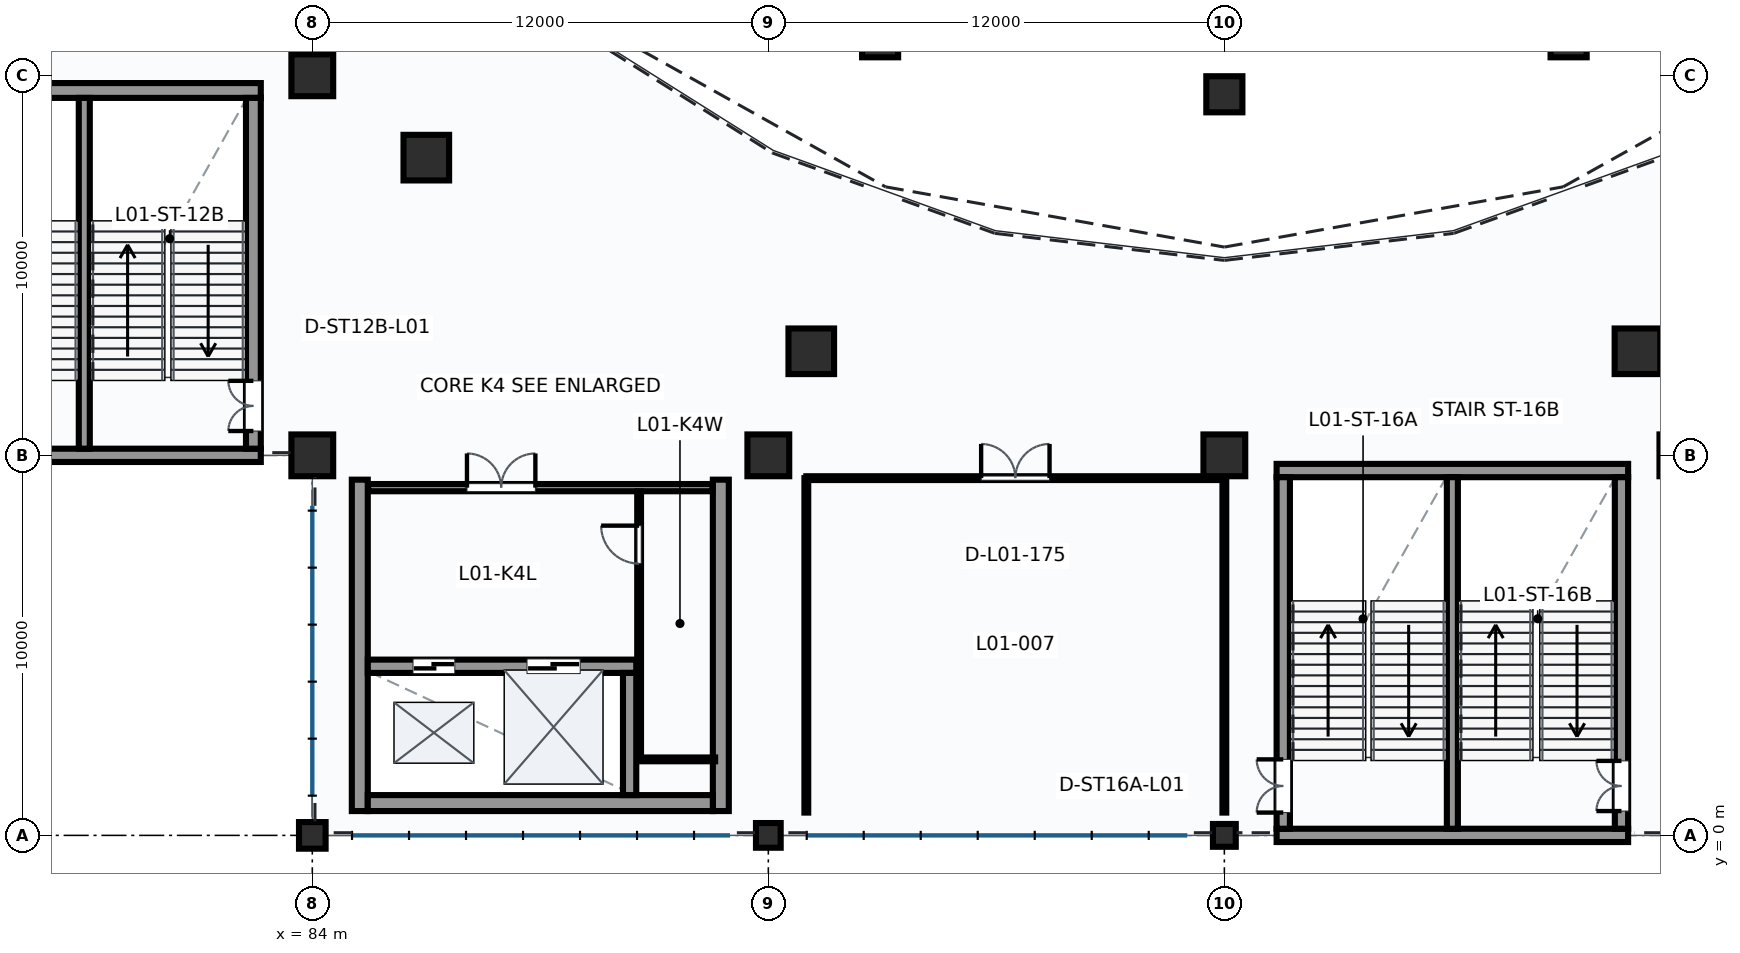
"""IFC4 building model, lengths in metres.
Left out: names, types, materials, properties, quantities, classifications, styles, units other than length and angle.
Written with IfcOpenShell. Run it as: python <this file> out.ifc"""

import sys

from ifc_helpers import new_model, si_unit, direction, frame, frame_2d, origin, origin_2d, place, context, subcontext, project, spatial, rectangle, extrude, element, fill, save


model = new_model("IFC4")
c1 = context("Model", 3, precision=1e-05, world=origin(), true_north=direction((0.0, 1.0)))
c2 = subcontext(c1, "Body", "Model", "MODEL_VIEW")
j1 = project(units=[si_unit("LENGTHUNIT", "METRE"), si_unit("PLANEANGLEUNIT", "RADIAN")], contexts=[c1])
p1 = place(None, origin())
s1 = spatial("IfcSite", under=j1, at=p1, CompositionType="ELEMENT")
p2 = place(p1, origin())
s2 = spatial("IfcBuilding", under=s1, at=p2, CompositionType="ELEMENT")
p3 = place(p2, frame((0.0, 0.0, 5.4)))
s3 = spatial("IfcBuildingStorey", under=s2, at=p3, CompositionType="ELEMENT", Elevation=5.4)
p4 = place(p3, frame((84.0, 0.0, 0.0), z_axis=(0.0, 0.0, 1.0), x_axis=(1.0, 0.0, 0.0)))
e1 = element("IfcColumn", 1, at=p4, inside=s3, PredefinedType="COLUMN", context=c2, shape_type="SweptSolid", body=[
    extrude(rectangle(XDim=0.7, YDim=0.7, at=origin_2d()), origin(), (0.0, 0.0, 1.0), 4.8),
])
for number, where, z_axis, x_axis in (
    (2, (84.0, 10.0, 0.0), (0.0, 0.0, 1.0), (1.0, 0.0, 0.0)),
    (3, (84.0, 20.0, 0.0), (0.0, 0.0, 1.0), (1.0, 0.0, 0.0)),
):
    element("IfcColumn", number, at=place(p3, frame(where, z_axis=z_axis, x_axis=x_axis)), inside=s3, PredefinedType="COLUMN", context=c2, shape_type="SweptSolid", body=[
        extrude(rectangle(XDim=1.1, YDim=1.1, at=origin_2d()), origin(), (0.0, 0.0, 1.0), 4.8),
    ])
p5 = place(p3, frame((96.0, 0.0, 0.0), z_axis=(0.0, 0.0, 1.0), x_axis=(1.0, 0.0, 0.0)))
e4 = element("IfcColumn", 4, at=p5, inside=s3, PredefinedType="COLUMN", context=c2, shape_type="SweptSolid", body=[
    extrude(rectangle(XDim=0.65, YDim=0.65, at=origin_2d()), origin(), (0.0, 0.0, 1.0), 4.8),
])
p6 = place(p3, frame((96.0, 10.0, 0.0), z_axis=(0.0, 0.0, 1.0), x_axis=(1.0, 0.0, 0.0)))
e5 = element("IfcColumn", 5, at=p6, inside=s3, PredefinedType="COLUMN", context=c2, shape_type="SweptSolid", body=[
    extrude(rectangle(XDim=1.1, YDim=1.1, at=origin_2d()), origin(), (0.0, 0.0, 1.0), 4.8),
])
p7 = place(p3, frame((108.0, 0.0, 0.0), z_axis=(0.0, 0.0, 1.0), x_axis=(1.0, 0.0, 0.0)))
e6 = element("IfcColumn", 6, at=p7, inside=s3, PredefinedType="COLUMN", context=c2, shape_type="SweptSolid", body=[
    extrude(rectangle(XDim=0.6, YDim=0.6, at=origin_2d()), origin(), (0.0, 0.0, 1.0), 4.8),
])
p8 = place(p3, frame((108.0, 10.0, 0.0), z_axis=(0.0, 0.0, 1.0), x_axis=(1.0, 0.0, 0.0)))
e7 = element("IfcColumn", 7, at=p8, inside=s3, PredefinedType="COLUMN", context=c2, shape_type="SweptSolid", body=[
    extrude(rectangle(XDim=1.1, YDim=1.1, at=origin_2d()), origin(), (0.0, 0.0, 1.0), 4.8),
])
p9 = place(p3, frame((87.0, 17.833, 0.0), z_axis=(0.0, 0.0, 1.0), x_axis=(1.0, 0.0, 0.0)))
e8 = element("IfcColumn", 8, at=p9, inside=s3, PredefinedType="COLUMN", context=c2, shape_type="SweptSolid", body=[
    extrude(rectangle(XDim=1.2, YDim=1.2, at=origin_2d()), origin(), (0.0, 0.0, 1.0), 4.8),
])
p10 = place(p3, frame((98.941, 20.948, 0.0), z_axis=(0.0, 0.0, 1.0), x_axis=(1.0, 0.0, 0.0)))
e9 = element("IfcColumn", 9, at=p10, inside=s3, PredefinedType="COLUMN", context=c2, shape_type="SweptSolid", body=[
    extrude(rectangle(XDim=0.95, YDim=0.95, at=origin_2d()), origin(), (0.0, 0.0, 1.0), 4.8),
])
p11 = place(p3, frame((97.13, 12.738, 0.0), z_axis=(0.0, 0.0, 1.0), x_axis=(1.0, 0.0, 0.0)))
e10 = element("IfcColumn", 10, at=p11, inside=s3, PredefinedType="COLUMN", context=c2, shape_type="SweptSolid", body=[
    extrude(rectangle(XDim=1.2, YDim=1.2, at=origin_2d()), origin(), (0.0, 0.0, 1.0), 4.8),
])
for number, where, z_axis, x_axis in (
    (11, (108.0, 19.5, 0.0), (0.0, 0.0, 1.0), (1.0, 0.0, 0.0)),
    (12, (117.059, 20.948, 0.0), (0.0, 0.0, 1.0), (1.0, 0.0, 0.0)),
):
    element("IfcColumn", number, at=place(p3, frame(where, z_axis=z_axis, x_axis=x_axis)), inside=s3, PredefinedType="COLUMN", context=c2, shape_type="SweptSolid", body=[
        extrude(rectangle(XDim=0.95, YDim=0.95, at=origin_2d()), origin(), (0.0, 0.0, 1.0), 4.8),
    ])
p12 = place(p3, frame((118.87, 12.738, 0.0), z_axis=(0.0, 0.0, 1.0), x_axis=(1.0, 0.0, 0.0)))
e13 = element("IfcColumn", 13, at=p12, inside=s3, PredefinedType="COLUMN", context=c2, shape_type="SweptSolid", body=[
    extrude(rectangle(XDim=1.2, YDim=1.2, at=origin_2d()), origin(), (0.0, 0.0, 1.0), 4.8),
])
p13 = place(p3, frame((73.355, 10.0, 0.0), z_axis=(0.0, 0.0, 1.0), x_axis=(1.0, 0.0, 0.0)))
e14 = element("IfcWall", 14, at=p13, inside=s3, PredefinedType="SHEAR", context=c2, shape_type="SweptSolid", body=[
    extrude(rectangle(XDim=9.29, YDim=0.35, at=frame_2d((4.645, 0.0))), origin(), (0.0, 0.0, 1.0), 3.906),
])
p14 = place(p3, frame((73.355, 19.6, 0.0), z_axis=(0.0, 0.0, 1.0), x_axis=(1.0, 0.0, 0.0)))
e15 = element("IfcWall", 15, at=p14, inside=s3, PredefinedType="SHEAR", context=c2, shape_type="SweptSolid", body=[
    extrude(rectangle(XDim=9.29, YDim=0.39, at=frame_2d((4.645, 0.0))), origin(), (0.0, 0.0, 1.0), 4.8),
])
p15 = place(p3, frame((82.45, 10.175, 0.0), z_axis=(0.0, 0.0, 1.0), x_axis=(0.0, 1.0, 0.0)))
e16 = element("IfcWall", 16, at=p15, inside=s3, PredefinedType="SHEAR", context=c2, shape_type="SweptSolid", body=[
    extrude(rectangle(XDim=9.23, YDim=0.39, at=frame_2d((4.615, 0.0))), origin(), (0.0, 0.0, 1.0), 4.8),
])
p16 = place(p15, frame((0.465, 0.0, 0.0)))
e17 = element("IfcOpeningElement", 17, at=p16, cuts=e16, PredefinedType="OPENING", context=c2, shape_type="SweptSolid", body=[
    extrude(rectangle(XDim=1.32, YDim=2.2, at=frame_2d((0.66, 1.1))), frame((0.0, 0.205, 0.0), z_axis=(0.0, -1.0, 0.0), x_axis=(1.0, 0.0, 0.0)), (0.0, 0.0, 1.0), 0.41),
])
p17 = place(p3, frame((78.0, 10.175, 0.0), z_axis=(0.0, 0.0, 1.0), x_axis=(0.0, 1.0, 0.0)))
e18 = element("IfcWall", 18, at=p17, inside=s3, PredefinedType="SHEAR", context=c2, shape_type="SweptSolid", body=[
    extrude(rectangle(XDim=9.23, YDim=0.29, at=frame_2d((4.615, 0.0))), origin(), (0.0, 0.0, 1.0), 4.8),
])
p18 = place(p3, frame((109.375, 0.0, 0.0), z_axis=(0.0, 0.0, 1.0), x_axis=(1.0, 0.0, 0.0)))
e19 = element("IfcWall", 19, at=p18, inside=s3, PredefinedType="SHEAR", context=c2, shape_type="SweptSolid", body=[
    extrude(rectangle(XDim=9.25, YDim=0.35, at=frame_2d((4.625, 0.0))), origin(), (0.0, 0.0, 1.0), 3.757),
])
p19 = place(p3, frame((109.375, 9.6, 0.0), z_axis=(0.0, 0.0, 1.0), x_axis=(1.0, 0.0, 0.0)))
e20 = element("IfcWall", 20, at=p19, inside=s3, PredefinedType="SHEAR", context=c2, shape_type="SweptSolid", body=[
    extrude(rectangle(XDim=9.25, YDim=0.35, at=frame_2d((4.625, 0.0))), origin(), (0.0, 0.0, 1.0), 4.8),
])
p20 = place(p3, frame((109.55, 0.175, 0.0), z_axis=(0.0, 0.0, 1.0), x_axis=(0.0, 1.0, 0.0)))
e21 = element("IfcWall", 21, at=p20, inside=s3, PredefinedType="SHEAR", context=c2, shape_type="SweptSolid", body=[
    extrude(rectangle(XDim=9.25, YDim=0.35, at=frame_2d((4.625, 0.0))), origin(), (0.0, 0.0, 1.0), 4.8),
])
p21 = place(p20, frame((0.425, 0.0, 0.0)))
e22 = element("IfcOpeningElement", 22, at=p21, cuts=e21, PredefinedType="OPENING", context=c2, shape_type="SweptSolid", body=[
    extrude(rectangle(XDim=1.4, YDim=2.2, at=frame_2d((0.7, 1.1))), frame((0.0, 0.185, 0.0), z_axis=(0.0, -1.0, 0.0), x_axis=(1.0, 0.0, 0.0)), (0.0, 0.0, 1.0), 0.37),
])
p22 = place(p3, frame((118.45, 0.175, 0.0), z_axis=(0.0, 0.0, 1.0), x_axis=(0.0, 1.0, 0.0)))
e23 = element("IfcWall", 23, at=p22, inside=s3, PredefinedType="SHEAR", context=c2, shape_type="SweptSolid", body=[
    extrude(rectangle(XDim=9.25, YDim=0.35, at=frame_2d((4.625, 0.0))), origin(), (0.0, 0.0, 1.0), 4.8),
])
p23 = place(p22, frame((0.465, 0.0, 0.0)))
e24 = element("IfcOpeningElement", 24, at=p23, cuts=e23, PredefinedType="OPENING", context=c2, shape_type="SweptSolid", body=[
    extrude(rectangle(XDim=1.32, YDim=2.2, at=frame_2d((0.66, 1.1))), frame((0.0, 0.185, 0.0), z_axis=(0.0, -1.0, 0.0), x_axis=(1.0, 0.0, 0.0)), (0.0, 0.0, 1.0), 0.37),
])
p24 = place(p3, frame((114.0, 0.175, 0.0), z_axis=(0.0, 0.0, 1.0), x_axis=(0.0, 1.0, 0.0)))
e25 = element("IfcWall", 25, at=p24, inside=s3, PredefinedType="SHEAR", context=c2, shape_type="SweptSolid", body=[
    extrude(rectangle(XDim=9.25, YDim=0.29, at=frame_2d((4.625, 0.0))), origin(), (0.0, 0.0, 1.0), 4.8),
])
for number, where, z_axis, x_axis in (
    (26, (85.25, 0.64, 0.0), (0.0, 0.0, 1.0), (0.0, 1.0, 0.0)),
    (27, (94.75, 0.64, 0.0), (0.0, 0.0, 1.0), (0.0, 1.0, 0.0)),
):
    element("IfcWall", number, at=place(p3, frame(where, z_axis=z_axis, x_axis=x_axis)), inside=s3, PredefinedType="SHEAR", context=c2, shape_type="SweptSolid", body=[
        extrude(rectangle(XDim=8.72, YDim=0.42, at=frame_2d((4.36, 0.0))), origin(), (0.0, 0.0, 1.0), 4.8),
    ])
p25 = place(p3, frame((85.46, 0.85, 0.0), z_axis=(0.0, 0.0, 1.0), x_axis=(1.0, 0.0, 0.0)))
e28 = element("IfcWall", 28, at=p25, inside=s3, PredefinedType="SHEAR", context=c2, shape_type="SweptSolid", body=[
    extrude(rectangle(XDim=9.08, YDim=0.42, at=frame_2d((4.54, 0.0))), origin(), (0.0, 0.0, 1.0), 4.8),
])
p26 = place(p3, frame((85.46, 4.45, 0.0), z_axis=(0.0, 0.0, 1.0), x_axis=(1.0, 0.0, 0.0)))
e29 = element("IfcWall", 29, at=p26, inside=s3, PredefinedType="SHEAR", context=c2, shape_type="SweptSolid", body=[
    extrude(rectangle(XDim=7.065, YDim=0.35, at=frame_2d((3.532, 0.0))), origin(), (0.0, 0.0, 1.0), 4.8),
])
p27 = place(p26, frame((1.19, 0.0, 0.0)))
e30 = element("IfcOpeningElement", 30, at=p27, cuts=e29, PredefinedType="OPENING", context=c2, shape_type="SweptSolid", body=[
    extrude(rectangle(XDim=1.1, YDim=2.2, at=frame_2d((0.55, 1.1))), frame((0.0, 0.185, 0.0), z_axis=(0.0, -1.0, 0.0), x_axis=(1.0, 0.0, 0.0)), (0.0, 0.0, 1.0), 0.37),
])
p28 = place(p26, frame((4.19, 0.0, 0.0)))
e31 = element("IfcOpeningElement", 31, at=p28, cuts=e29, PredefinedType="OPENING", context=c2, shape_type="SweptSolid", body=[
    extrude(rectangle(XDim=1.4, YDim=2.3, at=frame_2d((0.7, 1.15))), frame((0.0, 0.185, 0.0), z_axis=(0.0, -1.0, 0.0), x_axis=(1.0, 0.0, 0.0)), (0.0, 0.0, 1.0), 0.37),
])
p29 = place(p3, frame((92.35, 1.06, 0.0), z_axis=(0.0, 0.0, 1.0), x_axis=(0.0, 1.0, 0.0)))
e32 = element("IfcWall", 32, at=p29, inside=s3, PredefinedType="SHEAR", context=c2, shape_type="SweptSolid", body=[
    extrude(rectangle(XDim=3.215, YDim=0.35, at=frame_2d((1.607, 0.0))), origin(), (0.0, 0.0, 1.0), 4.8),
])
p30 = place(p3, frame((85.47, 9.15, 0.0), z_axis=(0.0, 0.0, 1.0), x_axis=(1.0, 0.0, 0.0)))
e33 = element("IfcWall", 33, at=p30, inside=s3, PredefinedType="PARTITIONING", context=c2, shape_type="SweptSolid", body=[
    extrude(rectangle(XDim=9.06, YDim=0.19, at=frame_2d((4.53, 0.0))), origin(), (0.0, 0.0, 1.0), 4.47),
])
p31 = place(p30, frame((2.6, 0.0, 0.0)))
e34 = element("IfcOpeningElement", 34, at=p31, cuts=e33, PredefinedType="OPENING", context=c2, shape_type="SweptSolid", body=[
    extrude(rectangle(XDim=1.8, YDim=2.3, at=frame_2d((0.9, 1.15))), frame((0.0, 0.105, 0.0), z_axis=(0.0, -1.0, 0.0), x_axis=(1.0, 0.0, 0.0)), (0.0, 0.0, 1.0), 0.21),
])
p32 = place(p3, frame((92.6, 2.0, 0.0), z_axis=(0.0, 0.0, 1.0), x_axis=(0.0, 1.0, 0.0)))
e35 = element("IfcWall", 35, at=p32, inside=s3, PredefinedType="PARTITIONING", context=c2, shape_type="SweptSolid", body=[
    extrude(rectangle(XDim=7.05, YDim=0.1, at=frame_2d((3.525, 0.0))), origin(), (0.0, 0.0, 1.0), 4.47),
])
p33 = place(p32, frame((5.15, 0.0, 0.0)))
e36 = element("IfcOpeningElement", 36, at=p33, cuts=e35, PredefinedType="OPENING", context=c2, shape_type="SweptSolid", body=[
    extrude(rectangle(XDim=1.0, YDim=2.1, at=frame_2d((0.5, 1.05))), frame((0.0, 0.06, 0.0), z_axis=(0.0, -1.0, 0.0), x_axis=(1.0, 0.0, 0.0)), (0.0, 0.0, 1.0), 0.12),
])
p34 = place(p3, frame((92.6, 2.0, 0.0), z_axis=(0.0, 0.0, 1.0), x_axis=(1.0, 0.0, 0.0)))
e37 = element("IfcWall", 37, at=p34, inside=s3, PredefinedType="PARTITIONING", context=c2, shape_type="SweptSolid", body=[
    extrude(rectangle(XDim=2.0, YDim=0.1, at=frame_2d((1.0, 0.0))), origin(), (0.0, 0.0, 1.0), 4.47),
])
p35 = place(p3, frame((108.0, 9.4, 0.0), z_axis=(0.0, 0.0, 1.0), x_axis=(0.0, -1.0, 0.0)))
e38 = element("IfcWall", 38, at=p35, inside=s3, PredefinedType="PARTITIONING", context=c2, shape_type="SweptSolid", body=[
    extrude(rectangle(XDim=8.8, YDim=0.1, at=frame_2d((4.4, 0.0))), origin(), (0.0, 0.0, 1.0), 3.599),
])
p36 = place(p3, frame((97.0, 0.6, 0.0), z_axis=(0.0, 0.0, 1.0), x_axis=(0.0, 1.0, 0.0)))
e39 = element("IfcWall", 39, at=p36, inside=s3, PredefinedType="PARTITIONING", context=c2, shape_type="SweptSolid", body=[
    extrude(rectangle(XDim=8.8, YDim=0.1, at=frame_2d((4.4, 0.0))), origin(), (0.0, 0.0, 1.0), 4.04),
])
p37 = place(p3, frame((97.0, 9.4, 0.0), z_axis=(0.0, 0.0, 1.0), x_axis=(1.0, 0.0, 0.0)))
e40 = element("IfcWall", 40, at=p37, inside=s3, PredefinedType="PARTITIONING", context=c2, shape_type="SweptSolid", body=[
    extrude(rectangle(XDim=11.0, YDim=0.1, at=frame_2d((5.5, 0.0))), origin(), (0.0, 0.0, 1.0), 3.599),
])
p38 = place(p37, frame((4.6, 0.0, 0.0)))
e41 = element("IfcOpeningElement", 41, at=p38, cuts=e40, PredefinedType="OPENING", context=c2, shape_type="SweptSolid", body=[
    extrude(rectangle(XDim=1.8, YDim=2.3, at=frame_2d((0.9, 1.15))), frame((0.0, 0.06, 0.0), z_axis=(0.0, -1.0, 0.0), x_axis=(1.0, 0.0, 0.0)), (0.0, 0.0, 1.0), 0.12),
])
p39 = place(p16, origin())
e42 = element("IfcDoor", 42, at=p39, inside=s3, OperationType="DOUBLE_DOOR_SINGLE_SWING", PredefinedType="DOOR", context=c2, shape_type="SweptSolid", body=[
    extrude(rectangle(XDim=1.32, YDim=2.2, at=frame_2d((0.66, 1.1))), frame((0.0, 0.025, 0.0), z_axis=(0.0, -1.0, 0.0), x_axis=(1.0, 0.0, 0.0)), (0.0, 0.0, 1.0), 0.05),
])
fill(e17, e42)
p40 = place(p21, frame((1.4, 0.0, 0.0), z_axis=(0.0, 0.0, 1.0), x_axis=(-1.0, 0.0, 0.0)))
e43 = element("IfcDoor", 43, at=p40, inside=s3, OperationType="DOUBLE_DOOR_SINGLE_SWING", PredefinedType="DOOR", context=c2, shape_type="SweptSolid", body=[
    extrude(rectangle(XDim=1.4, YDim=2.2, at=frame_2d((0.7, 1.1))), frame((0.0, 0.025, 0.0), z_axis=(0.0, -1.0, 0.0), x_axis=(1.0, 0.0, 0.0)), (0.0, 0.0, 1.0), 0.05),
])
fill(e22, e43)
p41 = place(p23, origin())
e44 = element("IfcDoor", 44, at=p41, inside=s3, OperationType="DOUBLE_DOOR_SINGLE_SWING", PredefinedType="DOOR", context=c2, shape_type="SweptSolid", body=[
    extrude(rectangle(XDim=1.32, YDim=2.2, at=frame_2d((0.66, 1.1))), frame((0.0, 0.025, 0.0), z_axis=(0.0, -1.0, 0.0), x_axis=(1.0, 0.0, 0.0)), (0.0, 0.0, 1.0), 0.05),
])
fill(e24, e44)
p42 = place(p27, origin())
e45 = element("IfcDoor", 45, at=p42, inside=s3, OperationType="SLIDING_TO_LEFT", PredefinedType="DOOR", context=c2, shape_type="SweptSolid", body=[
    extrude(rectangle(XDim=1.1, YDim=2.2, at=frame_2d((0.55, 1.1))), frame((0.0, 0.025, 0.0), z_axis=(0.0, -1.0, 0.0), x_axis=(1.0, 0.0, 0.0)), (0.0, 0.0, 1.0), 0.05),
])
fill(e30, e45)
p43 = place(p28, origin())
e46 = element("IfcDoor", 46, at=p43, inside=s3, OperationType="SLIDING_TO_LEFT", PredefinedType="DOOR", context=c2, shape_type="SweptSolid", body=[
    extrude(rectangle(XDim=1.4, YDim=2.3, at=frame_2d((0.7, 1.15))), frame((0.0, 0.025, 0.0), z_axis=(0.0, -1.0, 0.0), x_axis=(1.0, 0.0, 0.0)), (0.0, 0.0, 1.0), 0.05),
])
fill(e31, e46)
p44 = place(p31, origin())
e47 = element("IfcDoor", 47, at=p44, inside=s3, OperationType="DOUBLE_DOOR_SINGLE_SWING", PredefinedType="DOOR", context=c2, shape_type="SweptSolid", body=[
    extrude(rectangle(XDim=1.8, YDim=2.3, at=frame_2d((0.9, 1.15))), frame((0.0, 0.025, 0.0), z_axis=(0.0, -1.0, 0.0), x_axis=(1.0, 0.0, 0.0)), (0.0, 0.0, 1.0), 0.05),
])
fill(e34, e47)
p45 = place(p33, origin())
e48 = element("IfcDoor", 48, at=p45, inside=s3, OperationType="SINGLE_SWING_RIGHT", PredefinedType="DOOR", context=c2, shape_type="SweptSolid", body=[
    extrude(rectangle(XDim=1.0, YDim=2.1, at=frame_2d((0.5, 1.05))), frame((0.0, 0.025, 0.0), z_axis=(0.0, -1.0, 0.0), x_axis=(1.0, 0.0, 0.0)), (0.0, 0.0, 1.0), 0.05),
])
fill(e36, e48)
p46 = place(p38, origin())
e49 = element("IfcDoor", 49, at=p46, inside=s3, OperationType="DOUBLE_DOOR_SINGLE_SWING", PredefinedType="DOOR", context=c2, shape_type="SweptSolid", body=[
    extrude(rectangle(XDim=1.8, YDim=2.3, at=frame_2d((0.9, 1.15))), frame((0.0, 0.025, 0.0), z_axis=(0.0, -1.0, 0.0), x_axis=(1.0, 0.0, 0.0)), (0.0, 0.0, 1.0), 0.05),
])
fill(e41, e49)
save(model, sys.argv[1])
